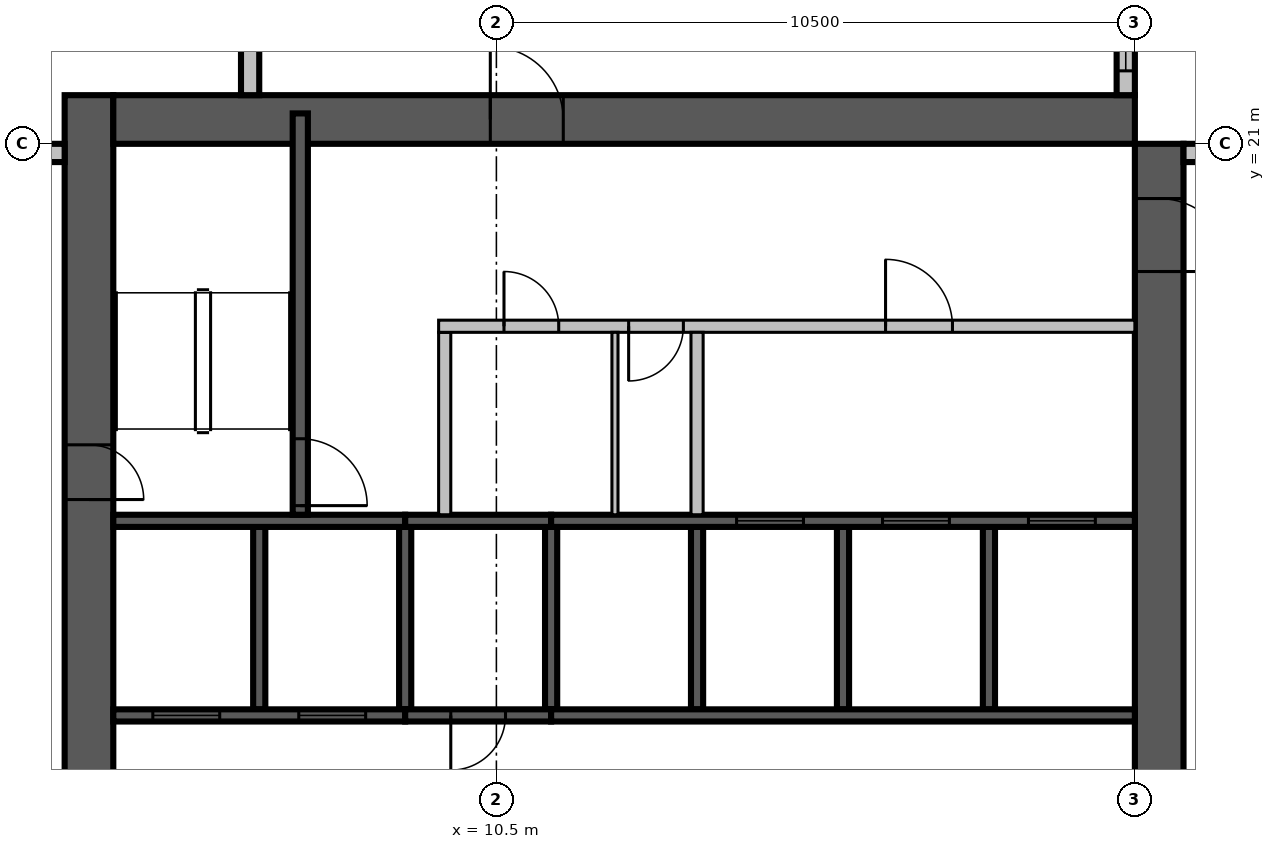
"""IFC4 building model, lengths in metres.
Left out: names, types, materials, properties, quantities, classifications, styles, units other than length and angle.
Written with IfcOpenShell. Run it as: python <this file> out.ifc"""

import sys

from ifc_helpers import new_model, si_unit, direction, frame, frame_2d, origin, place, context, subcontext, project, spatial, rectangle, extrude, source, transform, mapped, element, fill, save


model = new_model("IFC4")
c1 = context("Model", 3, precision=1e-05, world=origin(), true_north=direction((0.0, 1.0)))
c2 = subcontext(c1, "Body", "Model", "MODEL_VIEW")
j1 = project(units=[si_unit("LENGTHUNIT", "METRE"), si_unit("PLANEANGLEUNIT", "RADIAN")], contexts=[c1])
p1 = place(None, origin())
s1 = spatial("IfcSite", under=j1, at=p1, CompositionType="ELEMENT")
p2 = place(p1, origin())
s2 = spatial("IfcBuilding", under=s1, at=p2, CompositionType="ELEMENT")
p3 = place(p2, frame((0.0, 0.0, 227.2)))
s3 = spatial("IfcBuildingStorey", under=s2, at=p3, CompositionType="ELEMENT", Elevation=227.2)
m1 = source(origin(), c2, "Body", "SweptSolid", [
    extrude(rectangle(XDim=17.6, YDim=0.8, at=frame_2d((8.8, 0.0))), origin(), (0.0, 0.0, 1.0), 3.8),
])
p4 = place(p3, frame((3.8, 4.2, 0.0), z_axis=(0.0, 0.0, 1.0), x_axis=(0.0, 1.0, 0.0)))
e1 = element("IfcWall", 1, at=p4, inside=s3, PredefinedType="SHEAR", context=c2, shape_type="MappedRepresentation", body=[
    mapped(m1, transform((0.0, 0.0, 0.0), scale=1.0)),
])
m2 = source(origin(), c2, "Body", "SweptSolid", [
    extrude(rectangle(XDim=2.2, YDim=2.1, at=frame_2d((1.1, 1.05))), frame((0.0, 0.41, 0.0), z_axis=(0.0, -1.0, 0.0), x_axis=(1.0, 0.0, 0.0)), (0.0, 0.0, 1.0), 0.82),
])
p5 = place(p4, frame((4.2, 0.0, 0.0)))
e2 = element("IfcOpeningElement", 2, at=p5, cuts=e1, PredefinedType="OPENING", context=c2, shape_type="MappedRepresentation", body=[
    mapped(m2, transform((0.0, 0.0, 0.0), scale=1.0)),
])
m3 = source(origin(), c2, "Body", "SweptSolid", [
    extrude(rectangle(XDim=0.9, YDim=2.1, at=frame_2d((0.45, 1.05))), frame((0.0, 0.41, 0.0), z_axis=(0.0, -1.0, 0.0), x_axis=(1.0, 0.0, 0.0)), (0.0, 0.0, 1.0), 0.82),
])
p6 = place(p4, frame((10.95, 0.0, 0.0)))
e3 = element("IfcOpeningElement", 3, at=p6, cuts=e1, PredefinedType="OPENING", context=c2, shape_type="MappedRepresentation", body=[
    mapped(m3, transform((0.0, 0.0, 0.0), scale=1.0)),
])
m4 = source(origin(), c2, "Body", "SweptSolid", [
    extrude(rectangle(XDim=16.8, YDim=0.8, at=frame_2d((8.4, 0.0))), origin(), (0.0, 0.0, 1.0), 3.8),
])
p7 = place(p3, frame((21.4, 4.2, 0.0), z_axis=(0.0, 0.0, 1.0), x_axis=(0.0, 1.0, 0.0)))
e4 = element("IfcWall", 4, at=p7, inside=s3, PredefinedType="SHEAR", context=c2, shape_type="MappedRepresentation", body=[
    mapped(m4, transform((0.0, 0.0, 0.0), scale=1.0)),
])
p8 = place(p7, frame((4.2, 0.0, 0.0)))
e5 = element("IfcOpeningElement", 5, at=p8, cuts=e4, PredefinedType="OPENING", context=c2, shape_type="MappedRepresentation", body=[
    mapped(m2, transform((0.0, 0.0, 0.0), scale=1.0)),
])
m5 = source(origin(), c2, "Body", "SweptSolid", [
    extrude(rectangle(XDim=1.2, YDim=2.1, at=frame_2d((0.6, 1.05))), frame((0.0, 0.41, 0.0), z_axis=(0.0, -1.0, 0.0), x_axis=(1.0, 0.0, 0.0)), (0.0, 0.0, 1.0), 0.82),
])
p9 = place(p7, frame((14.7, 0.0, 0.0)))
e6 = element("IfcOpeningElement", 6, at=p9, cuts=e4, PredefinedType="OPENING", context=c2, shape_type="MappedRepresentation", body=[
    mapped(m5, transform((0.0, 0.0, 0.0), scale=1.0)),
])
p10 = place(p3, frame((4.2, 21.4, 0.0), z_axis=(0.0, 0.0, 1.0), x_axis=(1.0, 0.0, 0.0)))
e7 = element("IfcWall", 7, at=p10, inside=s3, PredefinedType="SHEAR", context=c2, shape_type="MappedRepresentation", body=[
    mapped(m4, transform((0.0, 0.0, 0.0), scale=1.0)),
])
p11 = place(p10, frame((6.2, 0.0, 0.0)))
e8 = element("IfcOpeningElement", 8, at=p11, cuts=e7, PredefinedType="OPENING", context=c2, shape_type="MappedRepresentation", body=[
    mapped(m5, transform((0.0, 0.0, 0.0), scale=1.0)),
])
p12 = place(p3, frame((29.0, 20.85, 0.0), z_axis=(0.0, 0.0, 1.0), x_axis=(-1.0, 0.0, 0.0)))
e9 = element("IfcWall", 9, at=p12, inside=s3, PredefinedType="STANDARD", context=c2, shape_type="SweptSolid", body=[
    extrude(rectangle(XDim=7.2, YDim=0.3, at=frame_2d((3.6, 0.0))), origin(), (0.0, 0.0, 1.0), 3.4),
])
m6 = source(origin(), c2, "Body", "SweptSolid", [
    extrude(rectangle(XDim=3.0, YDim=2.3, at=frame_2d((1.5, 1.15))), frame((0.0, 0.16, 0.0), z_axis=(0.0, -1.0, 0.0), x_axis=(1.0, 0.0, 0.0)), (0.0, 0.0, 1.0), 0.32),
])
p13 = place(p12, frame((0.2, 0.0, 0.6)))
e10 = element("IfcOpeningElement", 10, at=p13, cuts=e9, PredefinedType="OPENING", context=c2, shape_type="MappedRepresentation", body=[
    mapped(m6, transform((0.0, 0.0, 0.0), scale=1.0)),
])
m7 = source(origin(), c2, "Body", "SweptSolid", [
    extrude(rectangle(XDim=1.8, YDim=2.3, at=frame_2d((0.9, 1.15))), frame((0.0, 0.16, 0.0), z_axis=(0.0, -1.0, 0.0), x_axis=(1.0, 0.0, 0.0)), (0.0, 0.0, 1.0), 0.32),
])
p14 = place(p12, frame((5.0, 0.0, 0.6)))
e11 = element("IfcOpeningElement", 11, at=p14, cuts=e9, PredefinedType="OPENING", context=c2, shape_type="MappedRepresentation", body=[
    mapped(m7, transform((0.0, 0.0, 0.0), scale=1.0)),
])
m8 = source(origin(), c2, "Body", "SweptSolid", [
    extrude(rectangle(XDim=7.2, YDim=0.3, at=frame_2d((3.6, 0.0))), origin(), (0.0, 0.0, 1.0), 3.4),
])
p15 = place(p3, frame((20.85, 21.8, 0.0), z_axis=(0.0, 0.0, 1.0), x_axis=(0.0, 1.0, 0.0)))
e12 = element("IfcWall", 12, at=p15, inside=s3, PredefinedType="STANDARD", context=c2, shape_type="MappedRepresentation", body=[
    mapped(m8, transform((0.0, 0.0, 0.0), scale=1.0)),
])
p16 = place(p15, frame((0.4, 0.0, 0.6)))
e13 = element("IfcOpeningElement", 13, at=p16, cuts=e12, PredefinedType="OPENING", context=c2, shape_type="MappedRepresentation", body=[
    mapped(m7, transform((0.0, 0.0, 0.0), scale=1.0)),
])
p17 = place(p15, frame((4.0, 0.0, 0.6)))
e14 = element("IfcOpeningElement", 14, at=p17, cuts=e12, PredefinedType="OPENING", context=c2, shape_type="MappedRepresentation", body=[
    mapped(m6, transform((0.0, 0.0, 0.0), scale=1.0)),
])
m9 = source(origin(), c2, "Body", "SweptSolid", [
    extrude(rectangle(XDim=8.6, YDim=0.3, at=frame_2d((4.3, 0.0))), origin(), (0.0, 0.0, 1.0), 3.4),
])
p18 = place(p3, frame((6.45, 30.4, 0.0), z_axis=(0.0, 0.0, 1.0), x_axis=(0.0, -1.0, 0.0)))
e15 = element("IfcWall", 15, at=p18, inside=s3, PredefinedType="STANDARD", context=c2, shape_type="MappedRepresentation", body=[
    mapped(m9, transform((0.0, 0.0, 0.0), scale=1.0)),
])
p19 = place(p18, frame((1.438, 0.0, 0.6)))
e16 = element("IfcOpeningElement", 16, at=p19, cuts=e15, PredefinedType="OPENING", context=c2, shape_type="MappedRepresentation", body=[
    mapped(m7, transform((0.0, 0.0, 0.0), scale=1.0)),
])
p20 = place(p18, frame((5.638, 0.0, 0.6)))
e17 = element("IfcOpeningElement", 17, at=p20, cuts=e15, PredefinedType="OPENING", context=c2, shape_type="MappedRepresentation", body=[
    mapped(m7, transform((0.0, 0.0, 0.0), scale=1.0)),
])
p21 = place(p3, frame((3.4, 20.85, 0.0), z_axis=(0.0, 0.0, 1.0), x_axis=(-1.0, 0.0, 0.0)))
e18 = element("IfcWall", 18, at=p21, inside=s3, PredefinedType="STANDARD", context=c2, shape_type="SweptSolid", body=[
    extrude(rectangle(XDim=2.6, YDim=0.3, at=frame_2d((1.3, 0.0))), origin(), (0.0, 0.0, 1.0), 3.4),
])
p22 = place(p21, frame((0.4, 0.0, 0.6)))
e19 = element("IfcOpeningElement", 19, at=p22, cuts=e18, PredefinedType="OPENING", context=c2, shape_type="MappedRepresentation", body=[
    mapped(m7, transform((0.0, 0.0, 0.0), scale=1.0)),
])
m10 = source(origin(), c2, "Body", "SweptSolid", [
    extrude(rectangle(XDim=3.0, YDim=0.2, at=frame_2d((1.5, 0.0))), origin(), (0.0, 0.0, 1.0), 3.8),
])
p23 = place(p3, frame((6.6, 11.7, 0.0), z_axis=(0.0, 0.0, 1.0), x_axis=(0.0, 1.0, 0.0)))
e20 = element("IfcWall", 20, at=p23, inside=s3, PredefinedType="SOLIDWALL", context=c2, shape_type="MappedRepresentation", body=[
    mapped(m10, transform((0.0, 0.0, 0.0), scale=1.0)),
])
m11 = source(origin(), c2, "Body", "SweptSolid", [
    extrude(rectangle(XDim=3.0, YDim=0.2, at=frame_2d((1.5, 0.0))), origin(), (0.0, 0.0, 1.0), 3.4),
])
for number, where, z_axis, x_axis in (
    (21, (9.0, 11.7, 0.0), (0.0, 0.0, 1.0), (0.0, 1.0, 0.0)),
    (22, (11.4, 11.7, 0.0), (0.0, 0.0, 1.0), (0.0, 1.0, 0.0)),
):
    element("IfcWall", number, at=place(p3, frame(where, z_axis=z_axis, x_axis=x_axis)), inside=s3, PredefinedType="SOLIDWALL", context=c2, shape_type="MappedRepresentation", body=[
        mapped(m11, transform((0.0, 0.0, 0.0), scale=1.0)),
    ])
for number, where, z_axis, x_axis in (
    (23, (13.8, 11.7, 0.0), (0.0, 0.0, 1.0), (0.0, 1.0, 0.0)),
    (24, (16.2, 11.7, 0.0), (0.0, 0.0, 1.0), (0.0, 1.0, 0.0)),
    (25, (18.6, 11.7, 0.0), (0.0, 0.0, 1.0), (0.0, 1.0, 0.0)),
):
    element("IfcWall", number, at=place(p3, frame(where, z_axis=z_axis, x_axis=x_axis)), inside=s3, PredefinedType="SOLIDWALL", context=c2, shape_type="MappedRepresentation", body=[
        mapped(m10, transform((0.0, 0.0, 0.0), scale=1.0)),
    ])
m12 = source(origin(), c2, "Body", "SweptSolid", [
    extrude(rectangle(XDim=4.8, YDim=0.2, at=frame_2d((2.4, 0.0))), origin(), (0.0, 0.0, 1.0), 3.8),
])
p24 = place(p3, frame((4.2, 11.6, 0.0), z_axis=(0.0, 0.0, 1.0), x_axis=(1.0, 0.0, 0.0)))
e26 = element("IfcWall", 26, at=p24, inside=s3, PredefinedType="SOLIDWALL", context=c2, shape_type="MappedRepresentation", body=[
    mapped(m12, transform((0.0, 0.0, 0.0), scale=1.0)),
])
m13 = source(origin(), c2, "Body", "SweptSolid", [
    extrude(rectangle(XDim=1.1, YDim=2.1, at=frame_2d((0.55, 1.05))), frame((0.0, 0.11, 0.0), z_axis=(0.0, -1.0, 0.0), x_axis=(1.0, 0.0, 0.0)), (0.0, 0.0, 1.0), 0.22),
])
p25 = place(p24, frame((0.65, 0.0, 0.0)))
e27 = element("IfcOpeningElement", 27, at=p25, cuts=e26, PredefinedType="OPENING", context=c2, shape_type="MappedRepresentation", body=[
    mapped(m13, transform((0.0, 0.0, 0.0), scale=1.0)),
])
p26 = place(p24, frame((3.05, 0.0, 0.0)))
e28 = element("IfcOpeningElement", 28, at=p26, cuts=e26, PredefinedType="OPENING", context=c2, shape_type="MappedRepresentation", body=[
    mapped(m13, transform((0.0, 0.0, 0.0), scale=1.0)),
])
m14 = source(origin(), c2, "Body", "SweptSolid", [
    extrude(rectangle(XDim=2.4, YDim=0.2, at=frame_2d((1.2, 0.0))), origin(), (0.0, 0.0, 1.0), 3.4),
])
p27 = place(p3, frame((9.0, 11.6, 0.0), z_axis=(0.0, 0.0, 1.0), x_axis=(1.0, 0.0, 0.0)))
e29 = element("IfcWall", 29, at=p27, inside=s3, PredefinedType="SOLIDWALL", context=c2, shape_type="MappedRepresentation", body=[
    mapped(m14, transform((0.0, 0.0, 0.0), scale=1.0)),
])
m15 = source(origin(), c2, "Body", "SweptSolid", [
    extrude(rectangle(XDim=0.9, YDim=2.1, at=frame_2d((0.45, 1.05))), frame((0.0, 0.11, 0.0), z_axis=(0.0, -1.0, 0.0), x_axis=(1.0, 0.0, 0.0)), (0.0, 0.0, 1.0), 0.22),
])
p28 = place(p27, frame((0.75, 0.0, 0.0)))
e30 = element("IfcOpeningElement", 30, at=p28, cuts=e29, PredefinedType="OPENING", context=c2, shape_type="MappedRepresentation", body=[
    mapped(m15, transform((0.0, 0.0, 0.0), scale=1.0)),
])
m16 = source(origin(), c2, "Body", "SweptSolid", [
    extrude(rectangle(XDim=9.6, YDim=0.2, at=frame_2d((4.8, 0.0))), origin(), (0.0, 0.0, 1.0), 3.8),
])
p29 = place(p3, frame((11.4, 11.6, 0.0), z_axis=(0.0, 0.0, 1.0), x_axis=(1.0, 0.0, 0.0)))
e31 = element("IfcWall", 31, at=p29, inside=s3, PredefinedType="SOLIDWALL", context=c2, shape_type="MappedRepresentation", body=[
    mapped(m16, transform((0.0, 0.0, 0.0), scale=1.0)),
])
p30 = place(p3, frame((4.2, 14.8, 0.0), z_axis=(0.0, 0.0, 1.0), x_axis=(1.0, 0.0, 0.0)))
e32 = element("IfcWall", 32, at=p30, inside=s3, PredefinedType="SOLIDWALL", context=c2, shape_type="MappedRepresentation", body=[
    mapped(m12, transform((0.0, 0.0, 0.0), scale=1.0)),
])
p31 = place(p3, frame((9.0, 14.8, 0.0), z_axis=(0.0, 0.0, 1.0), x_axis=(1.0, 0.0, 0.0)))
e33 = element("IfcWall", 33, at=p31, inside=s3, PredefinedType="SOLIDWALL", context=c2, shape_type="MappedRepresentation", body=[
    mapped(m14, transform((0.0, 0.0, 0.0), scale=1.0)),
])
p32 = place(p3, frame((11.4, 14.8, 0.0), z_axis=(0.0, 0.0, 1.0), x_axis=(1.0, 0.0, 0.0)))
e34 = element("IfcWall", 34, at=p32, inside=s3, PredefinedType="SOLIDWALL", context=c2, shape_type="MappedRepresentation", body=[
    mapped(m16, transform((0.0, 0.0, 0.0), scale=1.0)),
])
p33 = place(p32, frame((3.05, 0.0, 0.0)))
e35 = element("IfcOpeningElement", 35, at=p33, cuts=e34, PredefinedType="OPENING", context=c2, shape_type="MappedRepresentation", body=[
    mapped(m13, transform((0.0, 0.0, 0.0), scale=1.0)),
])
p34 = place(p32, frame((5.45, 0.0, 0.0)))
e36 = element("IfcOpeningElement", 36, at=p34, cuts=e34, PredefinedType="OPENING", context=c2, shape_type="MappedRepresentation", body=[
    mapped(m13, transform((0.0, 0.0, 0.0), scale=1.0)),
])
p35 = place(p32, frame((7.85, 0.0, 0.0)))
e37 = element("IfcOpeningElement", 37, at=p35, cuts=e34, PredefinedType="OPENING", context=c2, shape_type="MappedRepresentation", body=[
    mapped(m13, transform((0.0, 0.0, 0.0), scale=1.0)),
])
m17 = source(origin(), c2, "Body", "SweptSolid", [
    extrude(rectangle(XDim=6.6, YDim=0.25, at=frame_2d((3.3, 0.0))), origin(), (0.0, 0.0, 1.0), 3.4),
])
p36 = place(p3, frame((7.275, 14.9, 0.0), z_axis=(0.0, 0.0, 1.0), x_axis=(0.0, 1.0, 0.0)))
e38 = element("IfcWall", 38, at=p36, inside=s3, PredefinedType="SOLIDWALL", context=c2, shape_type="MappedRepresentation", body=[
    mapped(m17, transform((0.0, 0.0, 0.0), scale=1.0)),
])
m18 = source(origin(), c2, "Body", "SweptSolid", [
    extrude(rectangle(XDim=1.1, YDim=2.1, at=frame_2d((0.55, 1.05))), frame((0.0, 0.135, 0.0), z_axis=(0.0, -1.0, 0.0), x_axis=(1.0, 0.0, 0.0)), (0.0, 0.0, 1.0), 0.27),
])
p37 = place(p36, frame((0.15, 0.0, 0.0)))
e39 = element("IfcOpeningElement", 39, at=p37, cuts=e38, PredefinedType="OPENING", context=c2, shape_type="MappedRepresentation", body=[
    mapped(m18, transform((0.0, 0.0, 0.0), scale=1.0)),
])
m19 = source(origin(), c2, "Body", "SweptSolid", [
    extrude(rectangle(XDim=3.0, YDim=0.2, at=frame_2d((1.5, 0.0))), origin(), (0.0, 0.0, 1.0), 3.4),
])
p38 = place(p3, frame((9.65, 14.9, 0.0), z_axis=(0.0, 0.0, 1.0), x_axis=(0.0, 1.0, 0.0)))
e40 = element("IfcWall", 40, at=p38, inside=s3, PredefinedType="PARTITIONING", context=c2, shape_type="MappedRepresentation", body=[
    mapped(m19, transform((0.0, 0.0, 0.0), scale=1.0)),
])
m20 = source(origin(), c2, "Body", "SweptSolid", [
    extrude(rectangle(XDim=11.45, YDim=0.2, at=frame_2d((5.725, 0.0))), origin(), (0.0, 0.0, 1.0), 3.4),
])
p39 = place(p3, frame((9.55, 18.0, 0.0), z_axis=(0.0, 0.0, 1.0), x_axis=(1.0, 0.0, 0.0)))
e41 = element("IfcWall", 41, at=p39, inside=s3, PredefinedType="PARTITIONING", context=c2, shape_type="MappedRepresentation", body=[
    mapped(m20, transform((0.0, 0.0, 0.0), scale=1.0)),
])
p40 = place(p39, frame((1.075, 0.0, 0.0)))
e42 = element("IfcOpeningElement", 42, at=p40, cuts=e41, PredefinedType="OPENING", context=c2, shape_type="MappedRepresentation", body=[
    mapped(m15, transform((0.0, 0.0, 0.0), scale=1.0)),
])
p41 = place(p39, frame((3.125, 0.0, 0.0)))
e43 = element("IfcOpeningElement", 43, at=p41, cuts=e41, PredefinedType="OPENING", context=c2, shape_type="MappedRepresentation", body=[
    mapped(m15, transform((0.0, 0.0, 0.0), scale=1.0)),
])
p42 = place(p39, frame((7.35, 0.0, 0.0)))
e44 = element("IfcOpeningElement", 44, at=p42, cuts=e41, PredefinedType="OPENING", context=c2, shape_type="MappedRepresentation", body=[
    mapped(m13, transform((0.0, 0.0, 0.0), scale=1.0)),
])
p43 = place(p3, frame((13.8, 14.9, 0.0), z_axis=(0.0, 0.0, 1.0), x_axis=(0.0, 1.0, 0.0)))
e45 = element("IfcWall", 45, at=p43, inside=s3, PredefinedType="PARTITIONING", context=c2, shape_type="MappedRepresentation", body=[
    mapped(m19, transform((0.0, 0.0, 0.0), scale=1.0)),
])
m21 = source(origin(), c2, "Body", "SweptSolid", [
    extrude(rectangle(XDim=3.0, YDim=0.1, at=frame_2d((1.5, 0.0))), origin(), (0.0, 0.0, 1.0), 3.4),
])
p44 = place(p3, frame((12.45, 14.9, 0.0), z_axis=(0.0, 0.0, 1.0), x_axis=(0.0, 1.0, 0.0)))
e46 = element("IfcWall", 46, at=p44, inside=s3, PredefinedType="PARTITIONING", context=c2, shape_type="MappedRepresentation", body=[
    mapped(m21, transform((0.0, 0.0, 0.0), scale=1.0)),
])
m22 = source(origin(), c2, "Body", "SweptSolid", [
    extrude(rectangle(XDim=1.8, YDim=2.3, at=frame_2d((0.9, 1.15))), frame((0.0, 0.03, 0.0), z_axis=(0.0, -1.0, 0.0), x_axis=(1.0, 0.0, 0.0)), (0.0, 0.0, 1.0), 0.06),
])
p45 = place(p16, origin())
e47 = element("IfcWindow", 47, at=p45, inside=s3, PartitioningType="SINGLE_PANEL", PredefinedType="WINDOW", context=c2, shape_type="MappedRepresentation", body=[
    mapped(m22, transform((0.0, 0.0, 0.0), scale=1.0)),
])
fill(e13, e47)
m23 = source(origin(), c2, "Body", "SweptSolid", [
    extrude(rectangle(XDim=1.1, YDim=2.1, at=frame_2d((0.55, 1.05))), frame((0.0, 0.025, 0.0), z_axis=(0.0, -1.0, 0.0), x_axis=(1.0, 0.0, 0.0)), (0.0, 0.0, 1.0), 0.05),
])
p46 = place(p25, origin())
e48 = element("IfcDoor", 48, at=p46, inside=s3, OperationType="SLIDING_TO_LEFT", PredefinedType="DOOR", context=c2, shape_type="MappedRepresentation", body=[
    mapped(m23, transform((0.0, 0.0, 0.0), scale=1.0)),
])
fill(e27, e48)
p47 = place(p26, origin())
e49 = element("IfcDoor", 49, at=p47, inside=s3, OperationType="SLIDING_TO_LEFT", PredefinedType="DOOR", context=c2, shape_type="MappedRepresentation", body=[
    mapped(m23, transform((0.0, 0.0, 0.0), scale=1.0)),
])
fill(e28, e49)
m24 = source(origin(), c2, "Body", "SweptSolid", [
    extrude(rectangle(XDim=0.9, YDim=2.1, at=frame_2d((0.45, 1.05))), frame((0.0, 0.025, 0.0), z_axis=(0.0, -1.0, 0.0), x_axis=(1.0, 0.0, 0.0)), (0.0, 0.0, 1.0), 0.05),
])
p48 = place(p28, origin())
e50 = element("IfcDoor", 50, at=p48, inside=s3, OperationType="SINGLE_SWING_RIGHT", PredefinedType="DOOR", context=c2, shape_type="MappedRepresentation", body=[
    mapped(m24, transform((0.0, 0.0, 0.0), scale=1.0)),
])
fill(e30, e50)
p49 = place(p33, origin())
e51 = element("IfcDoor", 51, at=p49, inside=s3, OperationType="SLIDING_TO_LEFT", PredefinedType="DOOR", context=c2, shape_type="MappedRepresentation", body=[
    mapped(m23, transform((0.0, 0.0, 0.0), scale=1.0)),
])
fill(e35, e51)
p50 = place(p34, origin())
e52 = element("IfcDoor", 52, at=p50, inside=s3, OperationType="SLIDING_TO_LEFT", PredefinedType="DOOR", context=c2, shape_type="MappedRepresentation", body=[
    mapped(m23, transform((0.0, 0.0, 0.0), scale=1.0)),
])
fill(e36, e52)
p51 = place(p35, origin())
e53 = element("IfcDoor", 53, at=p51, inside=s3, OperationType="SLIDING_TO_LEFT", PredefinedType="DOOR", context=c2, shape_type="MappedRepresentation", body=[
    mapped(m23, transform((0.0, 0.0, 0.0), scale=1.0)),
])
fill(e37, e53)
p52 = place(p37, origin())
e54 = element("IfcDoor", 54, at=p52, inside=s3, OperationType="SINGLE_SWING_RIGHT", PredefinedType="DOOR", context=c2, shape_type="MappedRepresentation", body=[
    mapped(m23, transform((0.0, 0.0, 0.0), scale=1.0)),
])
fill(e39, e54)
p53 = place(p40, origin())
e55 = element("IfcDoor", 55, at=p53, inside=s3, OperationType="SINGLE_SWING_LEFT", PredefinedType="DOOR", context=c2, shape_type="MappedRepresentation", body=[
    mapped(m24, transform((0.0, 0.0, 0.0), scale=1.0)),
])
fill(e42, e55)
p54 = place(p41, origin())
e56 = element("IfcDoor", 56, at=p54, inside=s3, OperationType="SINGLE_SWING_RIGHT", PredefinedType="DOOR", context=c2, shape_type="MappedRepresentation", body=[
    mapped(m24, transform((0.0, 0.0, 0.0), scale=1.0)),
])
fill(e43, e56)
p55 = place(p42, origin())
e57 = element("IfcDoor", 57, at=p55, inside=s3, OperationType="SINGLE_SWING_LEFT", PredefinedType="DOOR", context=c2, shape_type="MappedRepresentation", body=[
    mapped(m23, transform((0.0, 0.0, 0.0), scale=1.0)),
])
fill(e44, e57)
m25 = source(origin(), c2, "Body", "SweptSolid", [
    extrude(rectangle(XDim=1.2, YDim=2.1, at=frame_2d((0.6, 1.05))), frame((0.0, 0.025, 0.0), z_axis=(0.0, -1.0, 0.0), x_axis=(1.0, 0.0, 0.0)), (0.0, 0.0, 1.0), 0.05),
])
p56 = place(p11, origin())
e58 = element("IfcDoor", 58, at=p56, inside=s3, OperationType="SINGLE_SWING_LEFT", PredefinedType="DOOR", context=c2, shape_type="MappedRepresentation", body=[
    mapped(m25, transform((0.0, 0.0, 0.0), scale=1.0)),
])
fill(e8, e58)
p57 = place(p9, origin())
e59 = element("IfcDoor", 59, at=p57, inside=s3, OperationType="SINGLE_SWING_RIGHT", PredefinedType="DOOR", context=c2, shape_type="MappedRepresentation", body=[
    mapped(m25, transform((0.0, 0.0, 0.0), scale=1.0)),
])
fill(e6, e59)
p58 = place(p6, origin())
e60 = element("IfcDoor", 60, at=p58, inside=s3, OperationType="SINGLE_SWING_RIGHT", PredefinedType="DOOR", context=c2, shape_type="MappedRepresentation", body=[
    mapped(m24, transform((0.0, 0.0, 0.0), scale=1.0)),
])
fill(e3, e60)
save(model, sys.argv[1])
